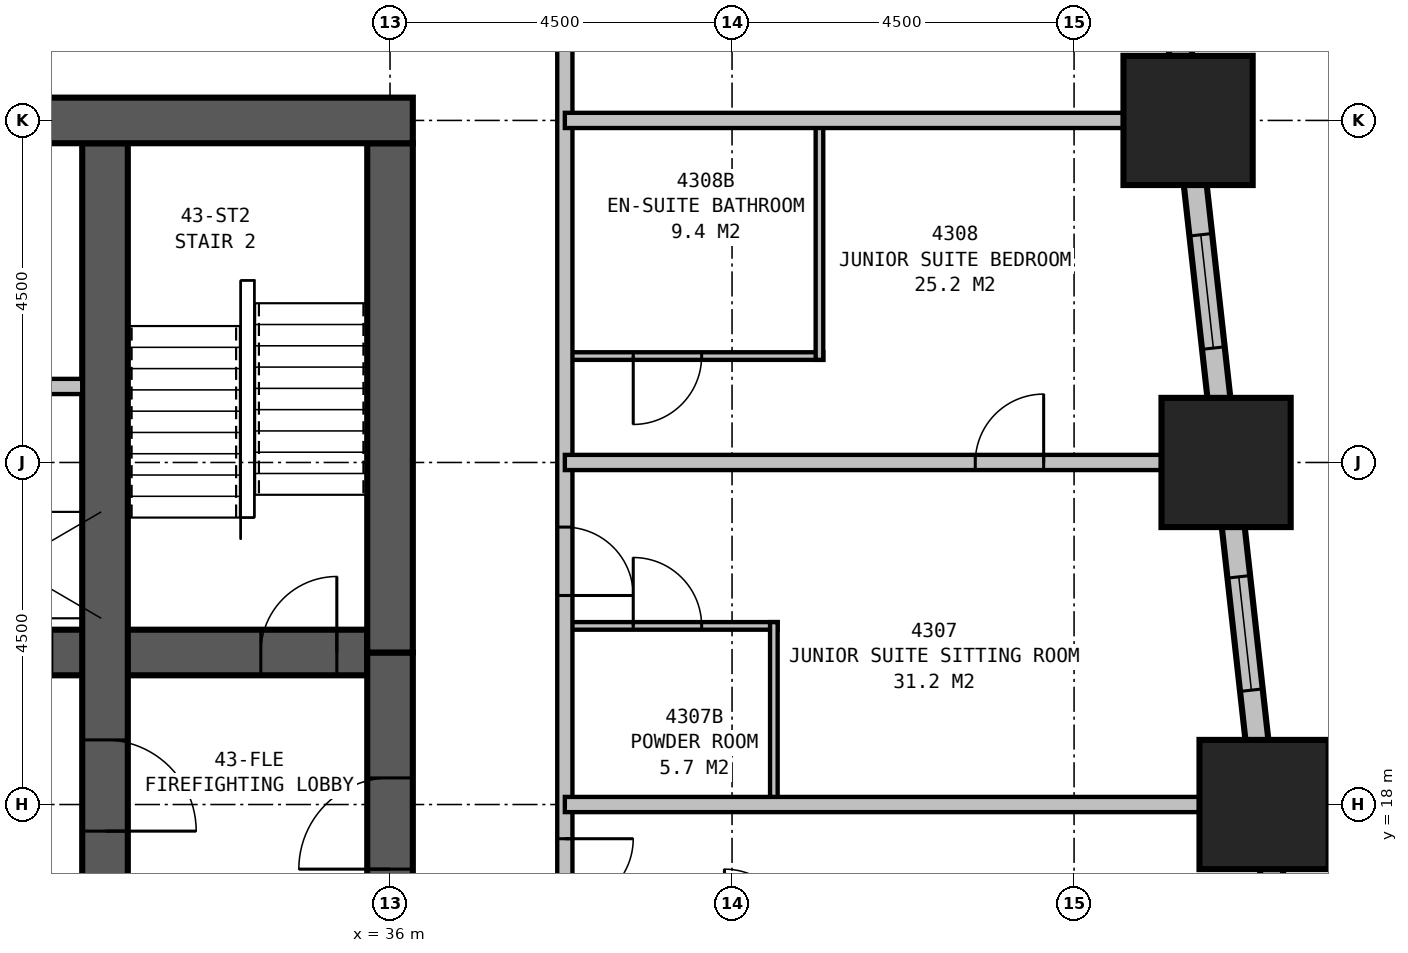
"""IFC4 building model, lengths in metres.
Left out: names, types, materials, properties, quantities, classifications, styles, units other than length and angle.
Written with IfcOpenShell. Run it as: python <this file> out.ifc"""

import sys

from ifc_helpers import new_model, si_unit, direction, frame, frame_2d, origin, origin_2d, place, context, subcontext, project, spatial, rectangle, extrude, element, fill, save


model = new_model("IFC4")
c1 = context("Model", 3, precision=1e-05, world=origin(), true_north=direction((0.0, 1.0)))
c2 = subcontext(c1, "Body", "Model", "MODEL_VIEW")
j1 = project(units=[si_unit("LENGTHUNIT", "METRE"), si_unit("PLANEANGLEUNIT", "RADIAN")], contexts=[c1])
p1 = place(None, origin())
s1 = spatial("IfcSite", under=j1, at=p1, CompositionType="ELEMENT")
p2 = place(p1, origin())
s2 = spatial("IfcBuilding", under=s1, at=p2, CompositionType="ELEMENT")
p3 = place(p2, frame((0.0, 0.0, 169.4)))
s3 = spatial("IfcBuildingStorey", under=s2, at=p3, CompositionType="ELEMENT", Elevation=169.4)
for number, where, z_axis, x_axis in (
    (1, (47.5, 18.0, 0.0), (0.0, 0.0, 1.0), (1.0, 0.0, 0.0)),
    (2, (47.0, 22.5, 0.0), (0.0, 0.0, 1.0), (1.0, 0.0, 0.0)),
    (3, (46.5, 27.0, 0.0), (0.0, 0.0, 1.0), (1.0, 0.0, 0.0)),
):
    element("IfcColumn", number, at=place(p3, frame(where, z_axis=z_axis, x_axis=x_axis)), inside=s3, PredefinedType="COLUMN", context=c2, shape_type="SweptSolid", body=[
        extrude(rectangle(XDim=1.7, YDim=1.7, at=origin_2d()), origin(), (0.0, 0.0, 1.0), 3.5),
    ])
p4 = place(p3, frame((36.3, 27.0, 0.0), z_axis=(0.0, 0.0, 1.0), x_axis=(-1.0, 0.0, 0.0)))
e4 = element("IfcWall", 4, at=p4, inside=s3, PredefinedType="SHEAR", context=c2, shape_type="SweptSolid", body=[
    extrude(rectangle(XDim=23.1, YDim=0.6, at=frame_2d((11.55, 0.0))), origin(), (0.0, 0.0, 1.0), 3.5),
])
p5 = place(p4, frame((17.05, 0.0, 0.0)))
e5 = element("IfcOpeningElement", 5, at=p5, cuts=e4, PredefinedType="OPENING", context=c2, shape_type="SweptSolid", body=[
    extrude(rectangle(XDim=1.0, YDim=2.1, at=frame_2d((0.5, 1.05))), frame((0.0, 0.31, 0.0), z_axis=(0.0, -1.0, 0.0), x_axis=(1.0, 0.0, 0.0)), (0.0, 0.0, 1.0), 0.62),
])
p6 = place(p4, frame((12.05, 0.0, 0.0)))
e6 = element("IfcOpeningElement", 6, at=p6, cuts=e4, PredefinedType="OPENING", context=c2, shape_type="SweptSolid", body=[
    extrude(rectangle(XDim=1.0, YDim=2.1, at=frame_2d((0.5, 1.05))), frame((0.0, 0.31, 0.0), z_axis=(0.0, -1.0, 0.0), x_axis=(1.0, 0.0, 0.0)), (0.0, 0.0, 1.0), 0.62),
])
p7 = place(p4, frame((7.05, 0.0, 0.0)))
e7 = element("IfcOpeningElement", 7, at=p7, cuts=e4, PredefinedType="OPENING", context=c2, shape_type="SweptSolid", body=[
    extrude(rectangle(XDim=1.0, YDim=2.1, at=frame_2d((0.5, 1.05))), frame((0.0, 0.31, 0.0), z_axis=(0.0, -1.0, 0.0), x_axis=(1.0, 0.0, 0.0)), (0.0, 0.0, 1.0), 0.62),
])
p8 = place(p3, frame((32.25, 13.8, 0.0), z_axis=(0.0, 0.0, 1.0), x_axis=(0.0, 1.0, 0.0)))
e8 = element("IfcWall", 8, at=p8, inside=s3, PredefinedType="SHEAR", context=c2, shape_type="SweptSolid", body=[
    extrude(rectangle(XDim=12.9, YDim=0.6, at=frame_2d((6.45, 0.0))), origin(), (0.0, 0.0, 1.0), 3.5),
])
p9 = place(p8, frame((5.05, 0.0, 0.0), z_axis=(0.0, 0.0, 1.0), x_axis=(-1.0, 0.0, 0.0)))
e9 = element("IfcOpeningElement", 9, at=p9, cuts=e8, PredefinedType="OPENING", context=c2, shape_type="SweptSolid", body=[
    extrude(rectangle(XDim=1.2, YDim=2.1, at=frame_2d((0.6, 1.05))), frame((0.0, 0.31, 0.0), z_axis=(0.0, -1.0, 0.0), x_axis=(1.0, 0.0, 0.0)), (0.0, 0.0, 1.0), 0.62),
])
p10 = place(p3, frame((13.8, 20.0, 0.0), z_axis=(0.0, 0.0, 1.0), x_axis=(1.0, 0.0, 0.0)))
e10 = element("IfcWall", 10, at=p10, inside=s3, PredefinedType="SHEAR", context=c2, shape_type="SweptSolid", body=[
    extrude(rectangle(XDim=21.9, YDim=0.6, at=frame_2d((10.95, 0.0))), origin(), (0.0, 0.0, 1.0), 3.5),
])
p11 = place(p10, frame((0.5, 0.0, 0.0)))
e11 = element("IfcOpeningElement", 11, at=p11, cuts=e10, PredefinedType="OPENING", context=c2, shape_type="SweptSolid", body=[
    extrude(rectangle(XDim=1.0, YDim=2.1, at=frame_2d((0.5, 1.05))), frame((0.0, 0.31, 0.0), z_axis=(0.0, -1.0, 0.0), x_axis=(1.0, 0.0, 0.0)), (0.0, 0.0, 1.0), 0.62),
])
p12 = place(p10, frame((20.5, 0.0, 0.0)))
e12 = element("IfcOpeningElement", 12, at=p12, cuts=e10, PredefinedType="OPENING", context=c2, shape_type="SweptSolid", body=[
    extrude(rectangle(XDim=1.0, YDim=2.1, at=frame_2d((0.5, 1.05))), frame((0.0, 0.31, 0.0), z_axis=(0.0, -1.0, 0.0), x_axis=(1.0, 0.0, 0.0)), (0.0, 0.0, 1.0), 0.62),
])
p13 = place(p10, frame((9.15, 0.0, 0.0)))
e13 = element("IfcOpeningElement", 13, at=p13, cuts=e10, PredefinedType="OPENING", context=c2, shape_type="SweptSolid", body=[
    extrude(rectangle(XDim=1.1, YDim=2.1, at=frame_2d((0.55, 1.05))), frame((0.0, 0.31, 0.0), z_axis=(0.0, -1.0, 0.0), x_axis=(1.0, 0.0, 0.0)), (0.0, 0.0, 1.0), 0.62),
])
p14 = place(p10, frame((11.65, 0.0, 0.0)))
e14 = element("IfcOpeningElement", 14, at=p14, cuts=e10, PredefinedType="OPENING", context=c2, shape_type="SweptSolid", body=[
    extrude(rectangle(XDim=1.1, YDim=2.1, at=frame_2d((0.55, 1.05))), frame((0.0, 0.31, 0.0), z_axis=(0.0, -1.0, 0.0), x_axis=(1.0, 0.0, 0.0)), (0.0, 0.0, 1.0), 0.62),
])
p15 = place(p10, frame((14.15, 0.0, 0.0)))
e15 = element("IfcOpeningElement", 15, at=p15, cuts=e10, PredefinedType="OPENING", context=c2, shape_type="SweptSolid", body=[
    extrude(rectangle(XDim=1.1, YDim=2.1, at=frame_2d((0.55, 1.05))), frame((0.0, 0.31, 0.0), z_axis=(0.0, -1.0, 0.0), x_axis=(1.0, 0.0, 0.0)), (0.0, 0.0, 1.0), 0.62),
])
p16 = place(p10, frame((16.65, 0.0, 0.0)))
e16 = element("IfcOpeningElement", 16, at=p16, cuts=e10, PredefinedType="OPENING", context=c2, shape_type="SweptSolid", body=[
    extrude(rectangle(XDim=1.1, YDim=2.1, at=frame_2d((0.55, 1.05))), frame((0.0, 0.31, 0.0), z_axis=(0.0, -1.0, 0.0), x_axis=(1.0, 0.0, 0.0)), (0.0, 0.0, 1.0), 0.62),
])
p17 = place(p10, frame((4.75, 0.0, 0.0)))
e17 = element("IfcOpeningElement", 17, at=p17, cuts=e10, PredefinedType="OPENING", context=c2, shape_type="SweptSolid", body=[
    extrude(rectangle(XDim=1.0, YDim=2.1, at=frame_2d((0.5, 1.05))), frame((0.0, 0.31, 0.0), z_axis=(0.0, -1.0, 0.0), x_axis=(1.0, 0.0, 0.0)), (0.0, 0.0, 1.0), 0.62),
])
p18 = place(p10, frame((6.7, 0.0, 0.0)))
e18 = element("IfcOpeningElement", 18, at=p18, cuts=e10, PredefinedType="OPENING", context=c2, shape_type="SweptSolid", body=[
    extrude(rectangle(XDim=1.0, YDim=2.1, at=frame_2d((0.5, 1.05))), frame((0.0, 0.31, 0.0), z_axis=(0.0, -1.0, 0.0), x_axis=(1.0, 0.0, 0.0)), (0.0, 0.0, 1.0), 0.62),
])
p19 = place(p3, frame((36.0, 16.5, 0.0), z_axis=(0.0, 0.0, 1.0), x_axis=(0.0, 1.0, 0.0)))
e19 = element("IfcWall", 19, at=p19, inside=s3, PredefinedType="SHEAR", context=c2, shape_type="SweptSolid", body=[
    extrude(rectangle(XDim=3.5, YDim=0.6, at=frame_2d((1.75, 0.0))), origin(), (0.0, 0.0, 1.0), 3.5),
])
p20 = place(p19, frame((0.65, 0.0, 0.0)))
e20 = element("IfcOpeningElement", 20, at=p20, cuts=e19, PredefinedType="OPENING", context=c2, shape_type="SweptSolid", body=[
    extrude(rectangle(XDim=1.2, YDim=2.1, at=frame_2d((0.6, 1.05))), frame((0.0, 0.31, 0.0), z_axis=(0.0, -1.0, 0.0), x_axis=(1.0, 0.0, 0.0)), (0.0, 0.0, 1.0), 0.62),
])
p21 = place(p3, frame((36.0, 20.0, 0.0), z_axis=(0.0, 0.0, 1.0), x_axis=(0.0, 1.0, 0.0)))
e21 = element("IfcWall", 21, at=p21, inside=s3, PredefinedType="SHEAR", context=c2, shape_type="SweptSolid", body=[
    extrude(rectangle(XDim=6.7, YDim=0.6, at=frame_2d((3.35, 0.0))), origin(), (0.0, 0.0, 1.0), 3.5),
])
p22 = place(p3, frame((49.017, 4.351, 0.0), z_axis=(0.0, 0.0, 1.0), x_axis=(-0.110433201132, 0.993883548555, 0.0)))
e22 = element("IfcWall", 22, at=p22, inside=s3, PredefinedType="STANDARD", context=c2, shape_type="SweptSolid", body=[
    extrude(rectangle(XDim=31.994, YDim=0.3, at=frame_2d((15.997, 0.0))), origin(), (0.0, 0.0, 1.0), 2.25),
])
p23 = place(p22, frame((1.664, 0.0, 0.5)))
e23 = element("IfcOpeningElement", 23, at=p23, cuts=e22, PredefinedType="OPENING", context=c2, shape_type="SweptSolid", body=[
    extrude(rectangle(XDim=1.5, YDim=1.6, at=frame_2d((0.75, 0.8))), frame((0.0, 0.16, 0.0), z_axis=(0.0, -1.0, 0.0), x_axis=(1.0, 0.0, 0.0)), (0.0, 0.0, 1.0), 0.32),
])
p24 = place(p22, frame((6.192, 0.0, 0.5)))
e24 = element("IfcOpeningElement", 24, at=p24, cuts=e22, PredefinedType="OPENING", context=c2, shape_type="SweptSolid", body=[
    extrude(rectangle(XDim=1.5, YDim=1.6, at=frame_2d((0.75, 0.8))), frame((0.0, 0.16, 0.0), z_axis=(0.0, -1.0, 0.0), x_axis=(1.0, 0.0, 0.0)), (0.0, 0.0, 1.0), 0.32),
])
p25 = place(p22, frame((10.719, 0.0, 0.5)))
e25 = element("IfcOpeningElement", 25, at=p25, cuts=e22, PredefinedType="OPENING", context=c2, shape_type="SweptSolid", body=[
    extrude(rectangle(XDim=1.5, YDim=1.6, at=frame_2d((0.75, 0.8))), frame((0.0, 0.16, 0.0), z_axis=(0.0, -1.0, 0.0), x_axis=(1.0, 0.0, 0.0)), (0.0, 0.0, 1.0), 0.32),
])
p26 = place(p22, frame((15.247, 0.0, 0.5)))
e26 = element("IfcOpeningElement", 26, at=p26, cuts=e22, PredefinedType="OPENING", context=c2, shape_type="SweptSolid", body=[
    extrude(rectangle(XDim=1.5, YDim=1.6, at=frame_2d((0.75, 0.8))), frame((0.0, 0.16, 0.0), z_axis=(0.0, -1.0, 0.0), x_axis=(1.0, 0.0, 0.0)), (0.0, 0.0, 1.0), 0.32),
])
p27 = place(p22, frame((19.775, 0.0, 0.5)))
e27 = element("IfcOpeningElement", 27, at=p27, cuts=e22, PredefinedType="OPENING", context=c2, shape_type="SweptSolid", body=[
    extrude(rectangle(XDim=1.5, YDim=1.6, at=frame_2d((0.75, 0.8))), frame((0.0, 0.16, 0.0), z_axis=(0.0, -1.0, 0.0), x_axis=(1.0, 0.0, 0.0)), (0.0, 0.0, 1.0), 0.32),
])
p28 = place(p22, frame((24.302, 0.0, 0.5)))
e28 = element("IfcOpeningElement", 28, at=p28, cuts=e22, PredefinedType="OPENING", context=c2, shape_type="SweptSolid", body=[
    extrude(rectangle(XDim=1.5, YDim=1.6, at=frame_2d((0.75, 0.8))), frame((0.0, 0.16, 0.0), z_axis=(0.0, -1.0, 0.0), x_axis=(1.0, 0.0, 0.0)), (0.0, 0.0, 1.0), 0.32),
])
p29 = place(p22, frame((28.83, 0.0, 0.5)))
e29 = element("IfcOpeningElement", 29, at=p29, cuts=e22, PredefinedType="OPENING", context=c2, shape_type="SweptSolid", body=[
    extrude(rectangle(XDim=1.5, YDim=1.6, at=frame_2d((0.75, 0.8))), frame((0.0, 0.16, 0.0), z_axis=(0.0, -1.0, 0.0), x_axis=(1.0, 0.0, 0.0)), (0.0, 0.0, 1.0), 0.32),
])
p30 = place(p3, frame((38.3, 10.6, 0.0), z_axis=(0.0, 0.0, 1.0), x_axis=(0.0, 1.0, 0.0)))
e30 = element("IfcWall", 30, at=p30, inside=s3, PredefinedType="PARTITIONING", context=c2, shape_type="SweptSolid", body=[
    extrude(rectangle(XDim=18.7, YDim=0.2, at=frame_2d((9.35, 0.0))), origin(), (0.0, 0.0, 1.0), 3.25),
])
p31 = place(p30, frame((6.95, 0.0, 0.0), z_axis=(0.0, 0.0, 1.0), x_axis=(-1.0, 0.0, 0.0)))
e31 = element("IfcOpeningElement", 31, at=p31, cuts=e30, PredefinedType="OPENING", context=c2, shape_type="SweptSolid", body=[
    extrude(rectangle(XDim=0.9, YDim=2.1, at=frame_2d((0.45, 1.05))), frame((0.0, 0.11, 0.0), z_axis=(0.0, -1.0, 0.0), x_axis=(1.0, 0.0, 0.0)), (0.0, 0.0, 1.0), 0.22),
])
p32 = place(p30, frame((11.05, 0.0, 0.0), z_axis=(0.0, 0.0, 1.0), x_axis=(-1.0, 0.0, 0.0)))
e32 = element("IfcOpeningElement", 32, at=p32, cuts=e30, PredefinedType="OPENING", context=c2, shape_type="SweptSolid", body=[
    extrude(rectangle(XDim=0.9, YDim=2.1, at=frame_2d((0.45, 1.05))), frame((0.0, 0.11, 0.0), z_axis=(0.0, -1.0, 0.0), x_axis=(1.0, 0.0, 0.0)), (0.0, 0.0, 1.0), 0.22),
])
p33 = place(p3, frame((38.3, 18.0, 0.0), z_axis=(0.0, 0.0, 1.0), x_axis=(1.0, 0.0, 0.0)))
e33 = element("IfcWall", 33, at=p33, inside=s3, PredefinedType="PARTITIONING", context=c2, shape_type="SweptSolid", body=[
    extrude(rectangle(XDim=9.199, YDim=0.2, at=frame_2d((4.6, 0.0))), origin(), (0.0, 0.0, 1.0), 2.25),
])
p34 = place(p3, frame((38.3, 22.5, 0.0), z_axis=(0.0, 0.0, 1.0), x_axis=(1.0, 0.0, 0.0)))
e34 = element("IfcWall", 34, at=p34, inside=s3, PredefinedType="PARTITIONING", context=c2, shape_type="SweptSolid", body=[
    extrude(rectangle(XDim=8.699, YDim=0.2, at=frame_2d((4.35, 0.0))), origin(), (0.0, 0.0, 1.0), 2.25),
])
p35 = place(p34, frame((5.4, 0.0, 0.0)))
e35 = element("IfcOpeningElement", 35, at=p35, cuts=e34, PredefinedType="OPENING", context=c2, shape_type="SweptSolid", body=[
    extrude(rectangle(XDim=0.9, YDim=2.1, at=frame_2d((0.45, 1.05))), frame((0.0, 0.11, 0.0), z_axis=(0.0, -1.0, 0.0), x_axis=(1.0, 0.0, 0.0)), (0.0, 0.0, 1.0), 0.22),
])
p36 = place(p3, frame((41.05, 18.0, 0.0), z_axis=(0.0, 0.0, 1.0), x_axis=(0.0, 1.0, 0.0)))
e36 = element("IfcWall", 36, at=p36, inside=s3, PredefinedType="PLUMBINGWALL", context=c2, shape_type="SweptSolid", body=[
    extrude(rectangle(XDim=2.4, YDim=0.1, at=frame_2d((1.2, 0.0))), origin(), (0.0, 0.0, 1.0), 3.25),
])
p37 = place(p3, frame((38.3, 20.35, 0.0), z_axis=(0.0, 0.0, 1.0), x_axis=(1.0, 0.0, 0.0)))
e37 = element("IfcWall", 37, at=p37, inside=s3, PredefinedType="PLUMBINGWALL", context=c2, shape_type="SweptSolid", body=[
    extrude(rectangle(XDim=2.8, YDim=0.1, at=frame_2d((1.4, 0.0))), origin(), (0.0, 0.0, 1.0), 3.25),
])
p38 = place(p37, frame((0.9, 0.0, 0.0)))
e38 = element("IfcOpeningElement", 38, at=p38, cuts=e37, PredefinedType="OPENING", context=c2, shape_type="SweptSolid", body=[
    extrude(rectangle(XDim=0.9, YDim=2.1, at=frame_2d((0.45, 1.05))), frame((0.0, 0.06, 0.0), z_axis=(0.0, -1.0, 0.0), x_axis=(1.0, 0.0, 0.0)), (0.0, 0.0, 1.0), 0.12),
])
p39 = place(p3, frame((41.65, 23.85, 0.0), z_axis=(0.0, 0.0, 1.0), x_axis=(0.0, 1.0, 0.0)))
e39 = element("IfcWall", 39, at=p39, inside=s3, PredefinedType="PLUMBINGWALL", context=c2, shape_type="SweptSolid", body=[
    extrude(rectangle(XDim=3.15, YDim=0.1, at=frame_2d((1.575, 0.0))), origin(), (0.0, 0.0, 1.0), 3.25),
])
p40 = place(p3, frame((38.3, 23.9, 0.0), z_axis=(0.0, 0.0, 1.0), x_axis=(1.0, 0.0, 0.0)))
e40 = element("IfcWall", 40, at=p40, inside=s3, PredefinedType="PLUMBINGWALL", context=c2, shape_type="SweptSolid", body=[
    extrude(rectangle(XDim=3.4, YDim=0.1, at=frame_2d((1.7, 0.0))), origin(), (0.0, 0.0, 1.0), 3.25),
])
p41 = place(p40, frame((1.8, 0.0, 0.0), z_axis=(0.0, 0.0, 1.0), x_axis=(-1.0, 0.0, 0.0)))
e41 = element("IfcOpeningElement", 41, at=p41, cuts=e40, PredefinedType="OPENING", context=c2, shape_type="SweptSolid", body=[
    extrude(rectangle(XDim=0.9, YDim=2.1, at=frame_2d((0.45, 1.05))), frame((0.0, 0.06, 0.0), z_axis=(0.0, -1.0, 0.0), x_axis=(1.0, 0.0, 0.0)), (0.0, 0.0, 1.0), 0.12),
])
p42 = place(p3, frame((38.3, 27.0, 0.0), z_axis=(0.0, 0.0, 1.0), x_axis=(1.0, 0.0, 0.0)))
e42 = element("IfcWall", 42, at=p42, inside=s3, PredefinedType="PARTITIONING", context=c2, shape_type="SweptSolid", body=[
    extrude(rectangle(XDim=7.977, YDim=0.2, at=frame_2d((3.988, 0.0))), origin(), (0.0, 0.0, 1.0), 1.95),
])
p43 = place(p3, frame((17.55, 23.5, 0.0), z_axis=(0.0, 0.0, 1.0), x_axis=(1.0, 0.0, 0.0)))
e43 = element("IfcWall", 43, at=p43, inside=s3, PredefinedType="PARTITIONING", context=c2, shape_type="SweptSolid", body=[
    extrude(rectangle(XDim=14.4, YDim=0.2, at=frame_2d((7.2, 0.0))), origin(), (0.0, 0.0, 1.0), 3.25),
])
p44 = place(p26, origin())
e44 = element("IfcWindow", 44, at=p44, inside=s3, PartitioningType="SINGLE_PANEL", PredefinedType="WINDOW", context=c2, shape_type="SweptSolid", body=[
    extrude(rectangle(XDim=1.5, YDim=1.6, at=frame_2d((0.75, 0.8))), frame((0.0, 0.03, 0.0), z_axis=(0.0, -1.0, 0.0), x_axis=(1.0, 0.0, 0.0)), (0.0, 0.0, 1.0), 0.06),
])
fill(e26, e44)
p45 = place(p27, origin())
e45 = element("IfcWindow", 45, at=p45, inside=s3, PartitioningType="SINGLE_PANEL", PredefinedType="WINDOW", context=c2, shape_type="SweptSolid", body=[
    extrude(rectangle(XDim=1.5, YDim=1.6, at=frame_2d((0.75, 0.8))), frame((0.0, 0.03, 0.0), z_axis=(0.0, -1.0, 0.0), x_axis=(1.0, 0.0, 0.0)), (0.0, 0.0, 1.0), 0.06),
])
fill(e27, e45)
p46 = place(p31, origin())
e46 = element("IfcDoor", 46, at=p46, inside=s3, OperationType="SINGLE_SWING_LEFT", PredefinedType="DOOR", context=c2, shape_type="SweptSolid", body=[
    extrude(rectangle(XDim=0.9, YDim=2.1, at=frame_2d((0.45, 1.05))), frame((0.0, 0.025, 0.0), z_axis=(0.0, -1.0, 0.0), x_axis=(1.0, 0.0, 0.0)), (0.0, 0.0, 1.0), 0.05),
])
fill(e31, e46)
p47 = place(p32, origin())
e47 = element("IfcDoor", 47, at=p47, inside=s3, OperationType="SINGLE_SWING_RIGHT", PredefinedType="DOOR", context=c2, shape_type="SweptSolid", body=[
    extrude(rectangle(XDim=0.9, YDim=2.1, at=frame_2d((0.45, 1.05))), frame((0.0, 0.025, 0.0), z_axis=(0.0, -1.0, 0.0), x_axis=(1.0, 0.0, 0.0)), (0.0, 0.0, 1.0), 0.05),
])
fill(e32, e47)
p48 = place(p35, origin())
e48 = element("IfcDoor", 48, at=p48, inside=s3, OperationType="SINGLE_SWING_RIGHT", PredefinedType="DOOR", context=c2, shape_type="SweptSolid", body=[
    extrude(rectangle(XDim=0.9, YDim=2.1, at=frame_2d((0.45, 1.05))), frame((0.0, 0.025, 0.0), z_axis=(0.0, -1.0, 0.0), x_axis=(1.0, 0.0, 0.0)), (0.0, 0.0, 1.0), 0.05),
])
fill(e35, e48)
p49 = place(p38, origin())
e49 = element("IfcDoor", 49, at=p49, inside=s3, OperationType="SINGLE_SWING_LEFT", PredefinedType="DOOR", context=c2, shape_type="SweptSolid", body=[
    extrude(rectangle(XDim=0.9, YDim=2.1, at=frame_2d((0.45, 1.05))), frame((0.0, 0.025, 0.0), z_axis=(0.0, -1.0, 0.0), x_axis=(1.0, 0.0, 0.0)), (0.0, 0.0, 1.0), 0.05),
])
fill(e38, e49)
p50 = place(p41, origin())
e50 = element("IfcDoor", 50, at=p50, inside=s3, OperationType="SINGLE_SWING_RIGHT", PredefinedType="DOOR", context=c2, shape_type="SweptSolid", body=[
    extrude(rectangle(XDim=0.9, YDim=2.1, at=frame_2d((0.45, 1.05))), frame((0.0, 0.025, 0.0), z_axis=(0.0, -1.0, 0.0), x_axis=(1.0, 0.0, 0.0)), (0.0, 0.0, 1.0), 0.05),
])
fill(e41, e50)
p51 = place(p20, origin())
e51 = element("IfcDoor", 51, at=p51, inside=s3, OperationType="SINGLE_SWING_LEFT", PredefinedType="DOOR", context=c2, shape_type="SweptSolid", body=[
    extrude(rectangle(XDim=1.2, YDim=2.1, at=frame_2d((0.6, 1.05))), frame((0.0, 0.3, 0.0), z_axis=(0.0, -1.0, 0.0), x_axis=(1.0, 0.0, 0.0)), (0.0, 0.0, 1.0), 0.6),
])
fill(e20, e51)
p52 = place(p9, origin())
e52 = element("IfcDoor", 52, at=p52, inside=s3, OperationType="SINGLE_SWING_RIGHT", PredefinedType="DOOR", context=c2, shape_type="SweptSolid", body=[
    extrude(rectangle(XDim=1.2, YDim=2.1, at=frame_2d((0.6, 1.05))), frame((0.0, 0.3, 0.0), z_axis=(0.0, -1.0, 0.0), x_axis=(1.0, 0.0, 0.0)), (0.0, 0.0, 1.0), 0.6),
])
fill(e9, e52)
p53 = place(p12, origin())
e53 = element("IfcDoor", 53, at=p53, inside=s3, OperationType="SINGLE_SWING_RIGHT", PredefinedType="DOOR", context=c2, shape_type="SweptSolid", body=[
    extrude(rectangle(XDim=1.0, YDim=2.1, at=frame_2d((0.5, 1.05))), frame((0.0, 0.3, 0.0), z_axis=(0.0, -1.0, 0.0), x_axis=(1.0, 0.0, 0.0)), (0.0, 0.0, 1.0), 0.6),
])
fill(e12, e53)
save(model, sys.argv[1])
